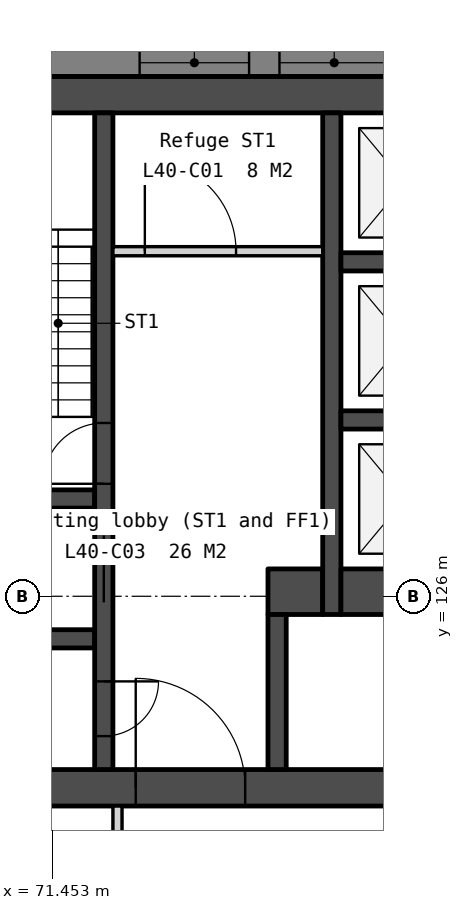
"""IFC4 building model, lengths in metres.
Left out: names, types, materials, properties, quantities, classifications, styles, units other than length and angle.
Written with IfcOpenShell. Run it as: python <this file> out.ifc"""

import sys

from ifc_helpers import new_model, si_unit, direction, frame, frame_2d, origin, place, context, subcontext, project, spatial, polyline, rectangle, outline, extrude, element, fill, save


model = new_model("IFC4")
c1 = context("Model", 3, precision=1e-05, world=origin(), true_north=direction((0.0, 1.0)))
c2 = subcontext(c1, "Body", "Model", "MODEL_VIEW")
j1 = project(units=[si_unit("LENGTHUNIT", "METRE"), si_unit("PLANEANGLEUNIT", "RADIAN")], contexts=[c1])
p1 = place(None, origin())
s1 = spatial("IfcSite", under=j1, at=p1, CompositionType="ELEMENT")
p2 = place(p1, origin())
s2 = spatial("IfcBuilding", under=s1, at=p2, CompositionType="ELEMENT")
p3 = place(p2, frame((0.0, 0.0, 159.8)))
s3 = spatial("IfcBuildingStorey", under=s2, at=p3, CompositionType="ELEMENT", Elevation=159.8)
p4 = place(p3, frame((69.0, 134.25, 0.0), z_axis=(0.0, 0.0, 1.0), x_axis=(1.0, 0.0, 0.0)))
e1 = element("IfcWall", 1, at=p4, inside=s3, PredefinedType="SOLIDWALL", context=c2, shape_type="SweptSolid", body=[
    extrude(rectangle(XDim=22.0, YDim=0.6, at=frame_2d((11.0, 0.0))), origin(), (0.0, 0.0, 1.0), 3.75),
])
p5 = place(p3, frame((69.0, 122.85, 0.0), z_axis=(0.0, 0.0, 1.0), x_axis=(1.0, 0.0, 0.0)))
e2 = element("IfcWall", 2, at=p5, inside=s3, PredefinedType="SOLIDWALL", context=c2, shape_type="SweptSolid", body=[
    extrude(rectangle(XDim=22.0, YDim=0.6, at=frame_2d((11.0, 0.0))), origin(), (0.0, 0.0, 1.0), 3.75),
])
p6 = place(p5, frame((16.375, 0.0, 0.0)))
e3 = element("IfcOpeningElement", 3, at=p6, cuts=e2, PredefinedType="OPENING", context=c2, shape_type="SweptSolid", body=[
    extrude(rectangle(XDim=1.8, YDim=2.1, at=frame_2d((0.9, 1.05))), frame((0.0, 0.31, 0.0), z_axis=(0.0, -1.0, 0.0), x_axis=(1.0, 0.0, 0.0)), (0.0, 0.0, 1.0), 0.62),
])
p7 = place(p5, frame((3.825, 0.0, 0.0)))
e4 = element("IfcOpeningElement", 4, at=p7, cuts=e2, PredefinedType="OPENING", context=c2, shape_type="SweptSolid", body=[
    extrude(rectangle(XDim=1.8, YDim=2.1, at=frame_2d((0.9, 1.05))), frame((0.0, 0.31, 0.0), z_axis=(0.0, -1.0, 0.0), x_axis=(1.0, 0.0, 0.0)), (0.0, 0.0, 1.0), 0.62),
])
p8 = place(p5, frame((12.85, 0.0, 0.0)))
e5 = element("IfcOpeningElement", 5, at=p8, cuts=e2, PredefinedType="OPENING", context=c2, shape_type="SweptSolid", body=[
    extrude(rectangle(XDim=1.5, YDim=2.1, at=frame_2d((0.75, 1.05))), frame((0.0, 0.31, 0.0), z_axis=(0.0, -1.0, 0.0), x_axis=(1.0, 0.0, 0.0)), (0.0, 0.0, 1.0), 0.62),
])
for number, where, z_axis, x_axis in (
    (6, (69.6, 127.6, 0.0), (0.0, 0.0, 1.0), (1.0, 0.0, 0.0)),
    (7, (69.6, 125.3, 0.0), (0.0, 0.0, 1.0), (1.0, 0.0, 0.0)),
):
    element("IfcWall", number, at=place(p3, frame(where, z_axis=z_axis, x_axis=x_axis)), inside=s3, PredefinedType="SOLIDWALL", context=c2, shape_type="SweptSolid", body=[
        extrude(rectangle(XDim=2.55, YDim=0.3, at=frame_2d((1.275, 0.0))), origin(), (0.0, 0.0, 1.0), 3.75),
    ])
p9 = place(p3, frame((72.3, 133.95, 0.0), z_axis=(0.0, 0.0, 1.0), x_axis=(0.0, -1.0, 0.0)))
e8 = element("IfcWall", 8, at=p9, inside=s3, PredefinedType="SOLIDWALL", context=c2, shape_type="SweptSolid", body=[
    extrude(rectangle(XDim=10.8, YDim=0.3, at=frame_2d((5.4, 0.0))), origin(), (0.0, 0.0, 1.0), 3.75),
])
p10 = place(p9, frame((6.95, 0.0, 0.0)))
e9 = element("IfcOpeningElement", 9, at=p10, cuts=e8, PredefinedType="OPENING", context=c2, shape_type="SweptSolid", body=[
    extrude(rectangle(XDim=1.1, YDim=2.1, at=frame_2d((0.55, 1.05))), frame((0.0, 0.16, 0.0), z_axis=(0.0, -1.0, 0.0), x_axis=(1.0, 0.0, 0.0)), (0.0, 0.0, 1.0), 0.32),
])
p11 = place(p9, frame((9.35, 0.0, 0.0)))
e10 = element("IfcOpeningElement", 10, at=p11, cuts=e8, PredefinedType="OPENING", context=c2, shape_type="SweptSolid", body=[
    extrude(rectangle(XDim=0.9, YDim=2.1, at=frame_2d((0.45, 1.05))), frame((0.0, 0.16, 0.0), z_axis=(0.0, -1.0, 0.0), x_axis=(1.0, 0.0, 0.0)), (0.0, 0.0, 1.0), 0.32),
])
p12 = place(p9, frame((5.1, 0.0, 0.0)))
e11 = element("IfcOpeningElement", 11, at=p12, cuts=e8, PredefinedType="OPENING", context=c2, shape_type="SweptSolid", body=[
    extrude(rectangle(XDim=1.0, YDim=2.1, at=frame_2d((0.5, 1.05))), frame((0.0, 0.16, 0.0), z_axis=(0.0, -1.0, 0.0), x_axis=(1.0, 0.0, 0.0)), (0.0, 0.0, 1.0), 0.32),
])
p13 = place(p3, frame((72.45, 131.675, 0.0), z_axis=(0.0, 0.0, 1.0), x_axis=(1.0, 0.0, 0.0)))
e12 = element("IfcWall", 12, at=p13, inside=s3, PredefinedType="PARTITIONING", context=c2, shape_type="SweptSolid", body=[
    extrude(rectangle(XDim=3.45, YDim=0.15, at=frame_2d((1.725, 0.0))), origin(), (0.0, 0.0, 1.0), 3.75),
])
p14 = place(p13, frame((0.525, 0.0, 0.0)))
e13 = element("IfcOpeningElement", 13, at=p14, cuts=e12, PredefinedType="OPENING", context=c2, shape_type="SweptSolid", body=[
    extrude(rectangle(XDim=1.5, YDim=2.1, at=frame_2d((0.75, 1.05))), frame((0.0, 0.085, 0.0), z_axis=(0.0, -1.0, 0.0), x_axis=(1.0, 0.0, 0.0)), (0.0, 0.0, 1.0), 0.17),
])
p15 = place(p3, frame((75.0, 126.075, 0.0), z_axis=(0.0, 0.0, 1.0), x_axis=(1.0, 0.0, 0.0)))
e14 = element("IfcWall", 14, at=p15, inside=s3, PredefinedType="SOLIDWALL", context=c2, shape_type="SweptSolid", body=[
    extrude(rectangle(XDim=0.9, YDim=0.75, at=frame_2d((0.45, 0.0))), origin(), (0.0, 0.0, 1.0), 3.75),
])
p16 = place(p3, frame((75.15, 125.7, 0.0), z_axis=(0.0, 0.0, 1.0), x_axis=(0.0, -1.0, 0.0)))
e15 = element("IfcWall", 15, at=p16, inside=s3, PredefinedType="SOLIDWALL", context=c2, shape_type="SweptSolid", body=[
    extrude(rectangle(XDim=2.55, YDim=0.3, at=frame_2d((1.275, 0.0))), origin(), (0.0, 0.0, 1.0), 3.75),
])
p17 = place(p3, frame((76.05, 133.95, 0.0), z_axis=(0.0, 0.0, 1.0), x_axis=(0.0, -1.0, 0.0)))
e16 = element("IfcWall", 16, at=p17, inside=s3, PredefinedType="SOLIDWALL", context=c2, shape_type="SweptSolid", body=[
    extrude(rectangle(XDim=8.25, YDim=0.3, at=frame_2d((4.125, 0.0))), origin(), (0.0, 0.0, 1.0), 3.75),
])
for number, where, z_axis, x_axis in (
    (17, (76.2, 131.5, 0.0), (0.0, 0.0, 1.0), (1.0, 0.0, 0.0)),
    (18, (76.2, 128.9, 0.0), (0.0, 0.0, 1.0), (1.0, 0.0, 0.0)),
):
    element("IfcWall", number, at=place(p3, frame(where, z_axis=z_axis, x_axis=x_axis)), inside=s3, PredefinedType="SOLIDWALL", context=c2, shape_type="SweptSolid", body=[
        extrude(rectangle(XDim=2.1, YDim=0.3, at=frame_2d((1.05, 0.0))), origin(), (0.0, 0.0, 1.0), 3.75),
    ])
p18 = place(p3, frame((76.2, 126.075, 0.0), z_axis=(0.0, 0.0, 1.0), x_axis=(1.0, 0.0, 0.0)))
e19 = element("IfcWall", 19, at=p18, inside=s3, PredefinedType="SOLIDWALL", context=c2, shape_type="SweptSolid", body=[
    extrude(rectangle(XDim=2.1, YDim=0.75, at=frame_2d((1.05, 0.0))), origin(), (0.0, 0.0, 1.0), 3.75),
])
p19 = place(p3, frame((100.243, 134.775, -0.15), z_axis=(0.0, 0.0, 1.0), x_axis=(-1.0, 0.0, 0.0)))
e20 = element("IfcWall", 20, at=p19, inside=s3, PredefinedType="SOLIDWALL", context=c2, shape_type="SweptSolid", body=[
    extrude(outline(polyline([(40.486, 0.0), (40.486, 3.9), (0.0, 3.9), (0.0, 0.0), (40.486, 0.0)])), frame((0.0, 0.225, 0.0), z_axis=(0.0, -1.0, 0.0), x_axis=(1.0, 0.0, 0.0)), (0.0, 0.0, 1.0), 0.45),
])
p20 = place(p19, frame((3.011, 0.0, 0.95)))
e21 = element("IfcOpeningElement", 21, at=p20, cuts=e20, PredefinedType="OPENING", context=c2, shape_type="SweptSolid", body=[
    extrude(rectangle(XDim=1.8, YDim=2.2, at=frame_2d((0.9, 1.1))), frame((0.0, 0.235, 0.0), z_axis=(0.0, -1.0, 0.0), x_axis=(1.0, 0.0, 0.0)), (0.0, 0.0, 1.0), 0.47),
])
p21 = place(p19, frame((5.311, 0.0, 0.95)))
e22 = element("IfcOpeningElement", 22, at=p21, cuts=e20, PredefinedType="OPENING", context=c2, shape_type="SweptSolid", body=[
    extrude(rectangle(XDim=1.8, YDim=2.2, at=frame_2d((0.9, 1.1))), frame((0.0, 0.235, 0.0), z_axis=(0.0, -1.0, 0.0), x_axis=(1.0, 0.0, 0.0)), (0.0, 0.0, 1.0), 0.47),
])
p22 = place(p19, frame((13.132, 0.0, 0.95)))
e23 = element("IfcOpeningElement", 23, at=p22, cuts=e20, PredefinedType="OPENING", context=c2, shape_type="SweptSolid", body=[
    extrude(rectangle(XDim=1.8, YDim=2.2, at=frame_2d((0.9, 1.1))), frame((0.0, 0.235, 0.0), z_axis=(0.0, -1.0, 0.0), x_axis=(1.0, 0.0, 0.0)), (0.0, 0.0, 1.0), 0.47),
])
p23 = place(p19, frame((15.432, 0.0, 0.95)))
e24 = element("IfcOpeningElement", 24, at=p23, cuts=e20, PredefinedType="OPENING", context=c2, shape_type="SweptSolid", body=[
    extrude(rectangle(XDim=1.8, YDim=2.2, at=frame_2d((0.9, 1.1))), frame((0.0, 0.235, 0.0), z_axis=(0.0, -1.0, 0.0), x_axis=(1.0, 0.0, 0.0)), (0.0, 0.0, 1.0), 0.47),
])
p24 = place(p19, frame((23.254, 0.0, 0.95)))
e25 = element("IfcOpeningElement", 25, at=p24, cuts=e20, PredefinedType="OPENING", context=c2, shape_type="SweptSolid", body=[
    extrude(rectangle(XDim=1.8, YDim=2.2, at=frame_2d((0.9, 1.1))), frame((0.0, 0.235, 0.0), z_axis=(0.0, -1.0, 0.0), x_axis=(1.0, 0.0, 0.0)), (0.0, 0.0, 1.0), 0.47),
])
p25 = place(p19, frame((25.554, 0.0, 0.95)))
e26 = element("IfcOpeningElement", 26, at=p25, cuts=e20, PredefinedType="OPENING", context=c2, shape_type="SweptSolid", body=[
    extrude(rectangle(XDim=1.8, YDim=2.2, at=frame_2d((0.9, 1.1))), frame((0.0, 0.235, 0.0), z_axis=(0.0, -1.0, 0.0), x_axis=(1.0, 0.0, 0.0)), (0.0, 0.0, 1.0), 0.47),
])
p26 = place(p19, frame((33.375, 0.0, 0.95)))
e27 = element("IfcOpeningElement", 27, at=p26, cuts=e20, PredefinedType="OPENING", context=c2, shape_type="SweptSolid", body=[
    extrude(rectangle(XDim=1.8, YDim=2.2, at=frame_2d((0.9, 1.1))), frame((0.0, 0.235, 0.0), z_axis=(0.0, -1.0, 0.0), x_axis=(1.0, 0.0, 0.0)), (0.0, 0.0, 1.0), 0.47),
])
p27 = place(p19, frame((35.675, 0.0, 0.95)))
e28 = element("IfcOpeningElement", 28, at=p27, cuts=e20, PredefinedType="OPENING", context=c2, shape_type="SweptSolid", body=[
    extrude(rectangle(XDim=1.8, YDim=2.2, at=frame_2d((0.9, 1.1))), frame((0.0, 0.235, 0.0), z_axis=(0.0, -1.0, 0.0), x_axis=(1.0, 0.0, 0.0)), (0.0, 0.0, 1.0), 0.47),
])
p28 = place(p3, frame((57.652, 131.129, -0.15), z_axis=(0.0, 0.0, 1.0), x_axis=(0.499997369791, -0.866026922331, 0.0)))
e29 = element("IfcWall", 29, at=p28, inside=s3, PredefinedType="SOLIDWALL", context=c2, shape_type="SweptSolid", body=[
    extrude(outline(polyline([(40.486, 0.0), (40.486, 3.9), (0.0, 3.9), (0.0, 0.0), (40.486, 0.0)])), frame((0.0, 0.225, 0.0), z_axis=(0.0, -1.0, 0.0), x_axis=(1.0, 0.0, 0.0)), (0.0, 0.0, 1.0), 0.45),
])
p29 = place(p28, frame((3.011, 0.0, 0.95)))
e30 = element("IfcOpeningElement", 30, at=p29, cuts=e29, PredefinedType="OPENING", context=c2, shape_type="SweptSolid", body=[
    extrude(rectangle(XDim=1.8, YDim=2.2, at=frame_2d((0.9, 1.1))), frame((0.0, 0.235, 0.0), z_axis=(0.0, -1.0, 0.0), x_axis=(1.0, 0.0, 0.0)), (0.0, 0.0, 1.0), 0.47),
])
p30 = place(p28, frame((5.311, 0.0, 0.95)))
e31 = element("IfcOpeningElement", 31, at=p30, cuts=e29, PredefinedType="OPENING", context=c2, shape_type="SweptSolid", body=[
    extrude(rectangle(XDim=1.8, YDim=2.2, at=frame_2d((0.9, 1.1))), frame((0.0, 0.235, 0.0), z_axis=(0.0, -1.0, 0.0), x_axis=(1.0, 0.0, 0.0)), (0.0, 0.0, 1.0), 0.47),
])
p31 = place(p28, frame((13.132, 0.0, 0.95)))
e32 = element("IfcOpeningElement", 32, at=p31, cuts=e29, PredefinedType="OPENING", context=c2, shape_type="SweptSolid", body=[
    extrude(rectangle(XDim=1.8, YDim=2.2, at=frame_2d((0.9, 1.1))), frame((0.0, 0.235, 0.0), z_axis=(0.0, -1.0, 0.0), x_axis=(1.0, 0.0, 0.0)), (0.0, 0.0, 1.0), 0.47),
])
p32 = place(p28, frame((15.432, 0.0, 0.95)))
e33 = element("IfcOpeningElement", 33, at=p32, cuts=e29, PredefinedType="OPENING", context=c2, shape_type="SweptSolid", body=[
    extrude(rectangle(XDim=1.8, YDim=2.2, at=frame_2d((0.9, 1.1))), frame((0.0, 0.235, 0.0), z_axis=(0.0, -1.0, 0.0), x_axis=(1.0, 0.0, 0.0)), (0.0, 0.0, 1.0), 0.47),
])
p33 = place(p28, frame((23.254, 0.0, 0.95)))
e34 = element("IfcOpeningElement", 34, at=p33, cuts=e29, PredefinedType="OPENING", context=c2, shape_type="SweptSolid", body=[
    extrude(rectangle(XDim=1.8, YDim=2.2, at=frame_2d((0.9, 1.1))), frame((0.0, 0.235, 0.0), z_axis=(0.0, -1.0, 0.0), x_axis=(1.0, 0.0, 0.0)), (0.0, 0.0, 1.0), 0.47),
])
p34 = place(p28, frame((25.554, 0.0, 0.95)))
e35 = element("IfcOpeningElement", 35, at=p34, cuts=e29, PredefinedType="OPENING", context=c2, shape_type="SweptSolid", body=[
    extrude(rectangle(XDim=1.8, YDim=2.2, at=frame_2d((0.9, 1.1))), frame((0.0, 0.235, 0.0), z_axis=(0.0, -1.0, 0.0), x_axis=(1.0, 0.0, 0.0)), (0.0, 0.0, 1.0), 0.47),
])
p35 = place(p28, frame((33.375, 0.0, 0.95)))
e36 = element("IfcOpeningElement", 36, at=p35, cuts=e29, PredefinedType="OPENING", context=c2, shape_type="SweptSolid", body=[
    extrude(rectangle(XDim=1.8, YDim=2.2, at=frame_2d((0.9, 1.1))), frame((0.0, 0.235, 0.0), z_axis=(0.0, -1.0, 0.0), x_axis=(1.0, 0.0, 0.0)), (0.0, 0.0, 1.0), 0.47),
])
p36 = place(p28, frame((35.675, 0.0, 0.95)))
e37 = element("IfcOpeningElement", 37, at=p36, cuts=e29, PredefinedType="OPENING", context=c2, shape_type="SweptSolid", body=[
    extrude(rectangle(XDim=1.8, YDim=2.2, at=frame_2d((0.9, 1.1))), frame((0.0, 0.235, 0.0), z_axis=(0.0, -1.0, 0.0), x_axis=(1.0, 0.0, 0.0)), (0.0, 0.0, 1.0), 0.47),
])
p37 = place(p3, frame((72.525, 121.927, 0.0), z_axis=(0.0, 0.0, 1.0), x_axis=(0.0, 1.0, 0.0)))
e38 = element("IfcWall", 38, at=p37, inside=s3, PredefinedType="PARTITIONING", context=c2, shape_type="SweptSolid", body=[
    extrude(rectangle(XDim=0.623, YDim=0.15, at=frame_2d((0.311, 0.0))), origin(), (0.0, 0.0, 1.0), 3.75),
])
p38 = place(p10, origin())
e39 = element("IfcDoor", 39, at=p38, inside=s3, OperationType="SLIDING_TO_LEFT", PredefinedType="DOOR", context=c2, shape_type="SweptSolid", body=[
    extrude(rectangle(XDim=1.1, YDim=2.1, at=frame_2d((0.55, 1.05))), frame((0.0, 0.025, 0.0), z_axis=(0.0, -1.0, 0.0), x_axis=(1.0, 0.0, 0.0)), (0.0, 0.0, 1.0), 0.05),
])
fill(e9, e39)
p39 = place(p7, origin())
e40 = element("IfcDoor", 40, at=p39, inside=s3, OperationType="DOUBLE_DOOR_DOUBLE_SWING", PredefinedType="DOOR", context=c2, shape_type="SweptSolid", body=[
    extrude(rectangle(XDim=1.8, YDim=2.1, at=frame_2d((0.9, 1.05))), frame((0.0, 0.025, 0.0), z_axis=(0.0, -1.0, 0.0), x_axis=(1.0, 0.0, 0.0)), (0.0, 0.0, 1.0), 0.05),
])
fill(e4, e40)
p40 = place(p14, origin())
e41 = element("IfcDoor", 41, at=p40, inside=s3, OperationType="DOUBLE_DOOR_DOUBLE_SWING", PredefinedType="DOOR", context=c2, shape_type="SweptSolid", body=[
    extrude(rectangle(XDim=1.5, YDim=2.1, at=frame_2d((0.75, 1.05))), frame((0.0, 0.025, 0.0), z_axis=(0.0, -1.0, 0.0), x_axis=(1.0, 0.0, 0.0)), (0.0, 0.0, 1.0), 0.05),
])
fill(e13, e41)
p41 = place(p11, origin())
e42 = element("IfcDoor", 42, at=p41, inside=s3, OperationType="SINGLE_SWING_LEFT", PredefinedType="DOOR", context=c2, shape_type="SweptSolid", body=[
    extrude(rectangle(XDim=0.9, YDim=2.1, at=frame_2d((0.45, 1.05))), frame((0.0, 0.025, 0.0), z_axis=(0.0, -1.0, 0.0), x_axis=(1.0, 0.0, 0.0)), (0.0, 0.0, 1.0), 0.05),
])
fill(e10, e42)
p42 = place(p12, origin())
e43 = element("IfcDoor", 43, at=p42, inside=s3, OperationType="SINGLE_SWING_RIGHT", PredefinedType="DOOR", context=c2, shape_type="SweptSolid", body=[
    extrude(rectangle(XDim=1.0, YDim=2.1, at=frame_2d((0.5, 1.05))), frame((0.0, 0.025, 0.0), z_axis=(0.0, -1.0, 0.0), x_axis=(1.0, 0.0, 0.0)), (0.0, 0.0, 1.0), 0.05),
])
fill(e11, e43)
p43 = place(p24, origin())
e44 = element("IfcWindow", 44, at=p43, inside=s3, PartitioningType="SINGLE_PANEL", PredefinedType="WINDOW", context=c2, shape_type="SweptSolid", body=[
    extrude(rectangle(XDim=1.8, YDim=2.2, at=frame_2d((0.9, 1.1))), frame((0.0, 0.03, 0.0), z_axis=(0.0, -1.0, 0.0), x_axis=(1.0, 0.0, 0.0)), (0.0, 0.0, 1.0), 0.06),
])
fill(e25, e44)
p44 = place(p25, origin())
e45 = element("IfcWindow", 45, at=p44, inside=s3, PartitioningType="SINGLE_PANEL", PredefinedType="WINDOW", context=c2, shape_type="SweptSolid", body=[
    extrude(rectangle(XDim=1.8, YDim=2.2, at=frame_2d((0.9, 1.1))), frame((0.0, 0.03, 0.0), z_axis=(0.0, -1.0, 0.0), x_axis=(1.0, 0.0, 0.0)), (0.0, 0.0, 1.0), 0.06),
])
fill(e26, e45)
save(model, sys.argv[1])
